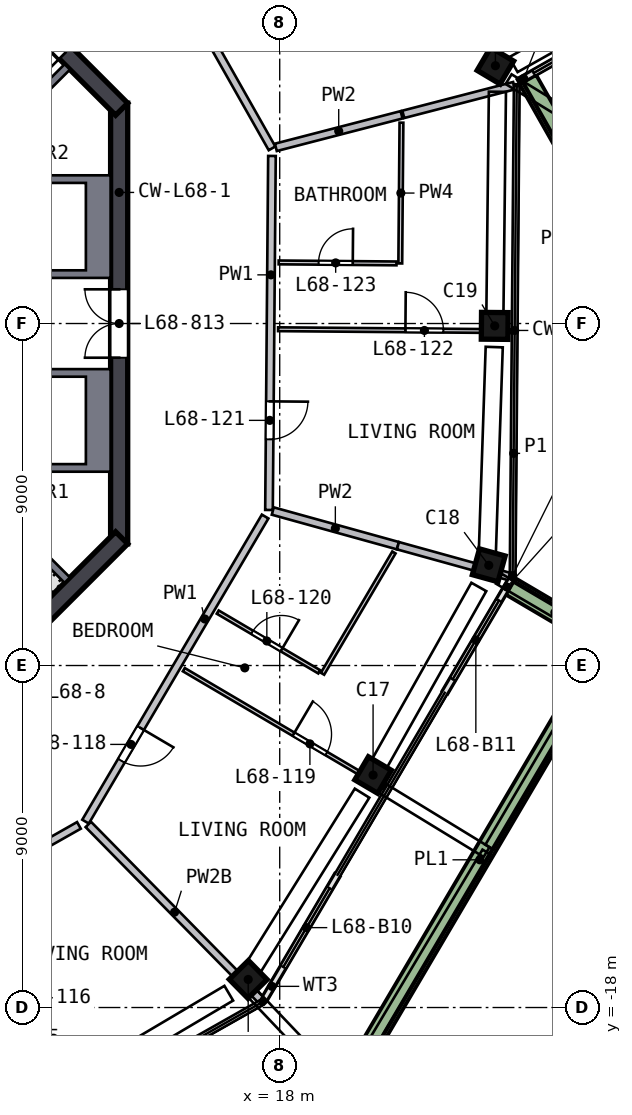
"""IFC4 building model, lengths in metres.
Left out: names, types, materials, properties, quantities, classifications, styles, units other than length and angle.
Written with IfcOpenShell. Run it as: python <this file> out.ifc"""

import sys

from ifc_helpers import new_model, si_unit, direction, frame, frame_2d, origin, origin_2d, place, context, subcontext, project, spatial, polyline, rectangle, outline, extrude, element, fill, save


model = new_model("IFC4")
c1 = context("Model", 3, precision=1e-05, world=origin(), true_north=direction((0.0, 1.0)))
c2 = subcontext(c1, "Body", "Model", "MODEL_VIEW")
j1 = project(units=[si_unit("LENGTHUNIT", "METRE"), si_unit("PLANEANGLEUNIT", "RADIAN")], contexts=[c1])
p1 = place(None, origin())
s1 = spatial("IfcSite", under=j1, at=p1, CompositionType="ELEMENT")
p2 = place(p1, origin())
s2 = spatial("IfcBuilding", under=s1, at=p2, CompositionType="ELEMENT")
p3 = place(p2, frame((0.0, 0.0, 277.5)))
s3 = spatial("IfcBuildingStorey", under=s2, at=p3, CompositionType="ELEMENT", Elevation=277.5)
p4 = place(p3, frame((17.072, -17.36, 0.0), z_axis=(0.081873788, 0.081797768, 0.993280327), x_axis=(-0.708616908, -0.696037958, 0.115729164)))
e1 = element("IfcColumn", 1, at=p4, inside=s3, PredefinedType="COLUMN", context=c2, shape_type="SweptSolid", body=[
    extrude(rectangle(XDim=0.7, YDim=0.7, at=origin_2d()), origin(), (0.0, 0.0, 1.0), 3.211),
])
p5 = place(p3, frame((20.389, -12.0, 0.0), z_axis=(0.056275557, 0.097493601, 0.993643829), x_axis=(0.504024539, 0.8563225, -0.112565713)))
e2 = element("IfcColumn", 2, at=p5, inside=s3, PredefinedType="COLUMN", context=c2, shape_type="SweptSolid", body=[
    extrude(rectangle(XDim=0.7, YDim=0.7, at=origin_2d()), origin(), (0.0, 0.0, 1.0), 3.21),
])
p6 = place(p3, frame((23.465, -6.499, 0.0), z_axis=(0.029951852, 0.111825315, 0.993276389), x_axis=(-0.265122623, -0.95724027, 0.115762953)))
e3 = element("IfcColumn", 3, at=p6, inside=s3, PredefinedType="COLUMN", context=c2, shape_type="SweptSolid", body=[
    extrude(rectangle(XDim=0.7, YDim=0.7, at=origin_2d()), origin(), (0.0, 0.0, 1.0), 3.211),
])
p7 = place(p3, frame((23.657, -0.198, 0.0), z_axis=(0.0, 0.112551351, 0.99364591), x_axis=(0.008431586, 0.993610589, -0.11254735)))
e4 = element("IfcColumn", 4, at=p7, inside=s3, PredefinedType="COLUMN", context=c2, shape_type="SweptSolid", body=[
    extrude(rectangle(XDim=0.7, YDim=0.7, at=origin_2d()), origin(), (0.0, 0.0, 1.0), 3.21),
])
p8 = place(p3, frame((23.715, 6.648, 0.0), z_axis=(-0.032531406, 0.112491779, 0.993119986), x_axis=(-0.511667819, -0.855438072, 0.080135812)))
e5 = element("IfcColumn", 5, at=p8, inside=s3, PredefinedType="COLUMN", context=c2, shape_type="SweptSolid", body=[
    extrude(rectangle(XDim=0.7, YDim=0.7, at=origin_2d()), origin(), (0.0, 0.0, 1.0), 3.212),
])
p9 = place(p3, frame((13.775, -5.799, 0.0), z_axis=(0.0, 0.0, 1.0), x_axis=(0.0, 1.0, 0.0)))
e6 = element("IfcWall", 6, at=p9, inside=s3, PredefinedType="SHEAR", context=c2, shape_type="SweptSolid", body=[
    extrude(rectangle(XDim=11.598, YDim=0.45, at=frame_2d((5.799, 0.0))), origin(), (0.0, 0.0, 1.0), 3.5),
])
p10 = place(p9, frame((4.899, 0.0, 0.0)))
e7 = element("IfcOpeningElement", 7, at=p10, cuts=e6, PredefinedType="OPENING", context=c2, shape_type="SweptSolid", body=[
    extrude(rectangle(XDim=1.8, YDim=2.1, at=frame_2d((0.9, 1.05))), frame((0.0, 0.235, 0.0), z_axis=(0.0, -1.0, 0.0), x_axis=(1.0, 0.0, 0.0)), (0.0, 0.0, 1.0), 0.47),
])
p11 = place(p3, frame((13.841, 5.64, 0.0), z_axis=(0.0, 0.0, 1.0), x_axis=(-0.707106781, 0.707106781, 0.0)))
e8 = element("IfcWall", 8, at=p11, inside=s3, PredefinedType="SHEAR", context=c2, shape_type="SweptSolid", body=[
    extrude(rectangle(XDim=11.598, YDim=0.45, at=frame_2d((5.799, 0.0))), origin(), (0.0, 0.0, 1.0), 3.5),
])
p12 = place(p11, frame((2.099, 0.0, 0.0)))
e9 = element("IfcOpeningElement", 9, at=p12, cuts=e8, PredefinedType="OPENING", context=c2, shape_type="SweptSolid", body=[
    extrude(rectangle(XDim=1.2, YDim=2.1, at=frame_2d((0.6, 1.05))), frame((0.0, 0.235, 0.0), z_axis=(0.0, -1.0, 0.0), x_axis=(1.0, 0.0, 0.0)), (0.0, 0.0, 1.0), 0.47),
])
p13 = place(p3, frame((5.64, -13.841, 0.0), z_axis=(0.0, 0.0, 1.0), x_axis=(0.707106781, 0.707106781, 0.0)))
e10 = element("IfcWall", 10, at=p13, inside=s3, PredefinedType="SHEAR", context=c2, shape_type="SweptSolid", body=[
    extrude(rectangle(XDim=11.598, YDim=0.45, at=frame_2d((5.799, 0.0))), origin(), (0.0, 0.0, 1.0), 3.5),
])
p14 = place(p13, frame((2.099, 0.0, 0.0)))
e11 = element("IfcOpeningElement", 11, at=p14, cuts=e10, PredefinedType="OPENING", context=c2, shape_type="SweptSolid", body=[
    extrude(rectangle(XDim=1.2, YDim=2.1, at=frame_2d((0.6, 1.05))), frame((0.0, 0.235, 0.0), z_axis=(0.0, -1.0, 0.0), x_axis=(1.0, 0.0, 0.0)), (0.0, 0.0, 1.0), 0.47),
])
p15 = place(p3, frame((17.595, -17.782, 0.0), z_axis=(0.0, 0.0, 1.0), x_axis=(0.507242714, 0.861803243, 0.0)))
e12 = element("IfcWall", 12, at=p15, inside=s3, PredefinedType="SOLIDWALL", context=c2, shape_type="SweptSolid", body=[
    extrude(rectangle(XDim=3.786, YDim=0.15, at=frame_2d((1.893, 0.0))), origin(), (0.0, 0.0, 1.0), 2.525),
])
p16 = place(p15, frame((0.987, 0.0, 0.0)))
e13 = element("IfcOpeningElement", 13, at=p16, cuts=e12, PredefinedType="OPENING", context=c2, shape_type="SweptSolid", body=[
    extrude(rectangle(XDim=2.4, YDim=2.4, at=frame_2d((1.2, 1.2))), frame((0.0, 0.085, 0.0), z_axis=(0.0, -1.0, 0.0), x_axis=(1.0, 0.0, 0.0)), (0.0, 0.0, 1.0), 0.17),
])
p17 = place(p3, frame((22.349, -9.705, 0.0), z_axis=(0.0, 0.0, 1.0), x_axis=(0.507238046, 0.86180599, 0.0)))
e14 = element("IfcWall", 14, at=p17, inside=s3, PredefinedType="SOLIDWALL", context=c2, shape_type="SweptSolid", body=[
    extrude(rectangle(XDim=3.427, YDim=0.15, at=frame_2d((1.713, 0.0))), origin(), (0.0, 0.0, 1.0), 2.525),
])
p18 = place(p17, frame((0.4, 0.0, 0.0)))
e15 = element("IfcOpeningElement", 15, at=p18, cuts=e14, PredefinedType="OPENING", context=c2, shape_type="SweptSolid", body=[
    extrude(rectangle(XDim=2.4, YDim=2.4, at=frame_2d((1.2, 1.2))), frame((0.0, 0.085, 0.0), z_axis=(0.0, -1.0, 0.0), x_axis=(1.0, 0.0, 0.0)), (0.0, 0.0, 1.0), 0.17),
])
p19 = place(p3, frame((24.336, 6.396, 0.0), z_axis=(0.0, 0.0, 1.0), x_axis=(0.870147605, 0.492791178, 0.0)))
e16 = element("IfcWall", 16, at=p19, inside=s3, PredefinedType="SOLIDWALL", context=c2, shape_type="SweptSolid", body=[
    extrude(rectangle(XDim=3.2, YDim=0.15, at=frame_2d((1.6, 0.0))), origin(), (0.0, 0.0, 1.0), 2.525),
])
p20 = place(p19, frame((0.4, 0.0, 0.0)))
e17 = element("IfcOpeningElement", 17, at=p20, cuts=e16, PredefinedType="OPENING", context=c2, shape_type="SweptSolid", body=[
    extrude(rectangle(XDim=2.4, YDim=2.4, at=frame_2d((1.2, 1.2))), frame((0.0, 0.085, 0.0), z_axis=(0.0, -1.0, 0.0), x_axis=(1.0, 0.0, 0.0)), (0.0, 0.0, 1.0), 0.17),
])
p21 = place(p3, frame((19.784, -20.026, 0.0), z_axis=(0.0, 0.0, 1.0), x_axis=(0.507246349, 0.861801103, 0.0)))
e18 = element("IfcWall", 18, at=p21, inside=s3, PredefinedType="SOLIDWALL", context=c2, shape_type="SweptSolid", body=[
    extrude(rectangle(XDim=13.723, YDim=0.5, at=frame_2d((6.862, 0.0))), origin(), (0.0, 0.0, 1.0), 0.7),
])
p22 = place(p3, frame((26.403, -8.288, 0.0), z_axis=(0.0, 0.0, 1.0), x_axis=(-0.861780702, 0.507281009, 0.0)))
e19 = element("IfcWall", 19, at=p22, inside=s3, PredefinedType="SOLIDWALL", context=c2, shape_type="SweptSolid", body=[
    extrude(rectangle(XDim=2.699, YDim=0.5, at=frame_2d((1.35, 0.0))), origin(), (0.0, 0.0, 1.0), 0.7),
])
p23 = place(p3, frame((24.53, 6.419, 0.0), z_axis=(0.0, 0.0, 1.0), x_axis=(0.492715997, -0.870190179, 0.0)))
e20 = element("IfcWall", 20, at=p23, inside=s3, PredefinedType="SOLIDWALL", context=c2, shape_type="SweptSolid", body=[
    extrude(rectangle(XDim=3.199, YDim=0.5, at=frame_2d((1.6, 0.0))), origin(), (0.0, 0.0, 1.0), 0.7),
])
p24 = place(p3, origin())
e21 = element("IfcWall", 21, at=p24, inside=s3, PredefinedType="SOLIDWALL", context=c2, shape_type="SweptSolid", body=[
    extrude(outline(polyline([(13.55, -3.9), (9.9, -3.9), (9.9, -3.7), (12.9, -3.7), (12.9, -1.4), (9.9, -1.4), (9.9, -1.2), (13.55, -1.2), (13.55, -3.9)])), origin(), (0.0, 0.0, 1.0), 3.19),
])
p25 = place(p3, origin())
e22 = element("IfcWall", 22, at=p25, inside=s3, PredefinedType="SOLIDWALL", context=c2, shape_type="SweptSolid", body=[
    extrude(outline(polyline([(13.55, 3.9), (13.55, 1.2), (9.9, 1.2), (9.9, 1.4), (12.9, 1.4), (12.9, 3.7), (9.9, 3.7), (9.9, 3.9), (13.55, 3.9)])), origin(), (0.0, 0.0, 1.0), 3.19),
])
for number, where, z_axis, x_axis in (
    (23, (9.334, 3.677, 0.0), (0.0, 0.0, 1.0), (0.707, 0.707, 0.0)),
    (24, (9.334, -3.677, 0.0), (0.0, 0.0, 1.0), (0.707, -0.707, 0.0)),
):
    element("IfcWall", number, at=place(p3, frame(where, z_axis=z_axis, x_axis=x_axis)), inside=s3, PredefinedType="SOLIDWALL", context=c2, shape_type="SweptSolid", body=[
        extrude(rectangle(XDim=4.35, YDim=0.2, at=frame_2d((2.175, 0.0))), origin(), (0.0, 0.0, 1.0), 3.19),
    ])
p26 = place(p3, frame((12.717, -13.207, 0.0), z_axis=(0.0, 0.0, 1.0), x_axis=(-0.870186015, -0.492723349, 0.0)))
e25 = element("IfcWall", 25, at=p26, inside=s3, PredefinedType="SOLIDWALL", context=c2, shape_type="SweptSolid", body=[
    extrude(rectangle(XDim=9.116, YDim=0.2, at=frame_2d((4.558, 0.0))), origin(), (0.0, 0.0, 1.0), 3.19),
])
p27 = place(p26, frame((1.7, 0.0, 0.0)))
e26 = element("IfcOpeningElement", 26, at=p27, cuts=e25, PredefinedType="OPENING", context=c2, shape_type="SweptSolid", body=[
    extrude(rectangle(XDim=1.0, YDim=2.1, at=frame_2d((0.5, 1.05))), frame((0.0, 0.11, 0.0), z_axis=(0.0, -1.0, 0.0), x_axis=(1.0, 0.0, 0.0)), (0.0, 0.0, 1.0), 0.22),
])
p28 = place(p3, frame((17.616, -5.079, 0.0), z_axis=(0.0, 0.0, 1.0), x_axis=(-0.507248004, -0.861800129, 0.0)))
e27 = element("IfcWall", 27, at=p28, inside=s3, PredefinedType="SOLIDWALL", context=c2, shape_type="SweptSolid", body=[
    extrude(rectangle(XDim=9.317, YDim=0.2, at=frame_2d((4.658, 0.0))), origin(), (0.0, 0.0, 1.0), 3.19),
])
p29 = place(p28, frame((6.458, 0.0, 0.0)))
e28 = element("IfcOpeningElement", 28, at=p29, cuts=e27, PredefinedType="OPENING", context=c2, shape_type="SweptSolid", body=[
    extrude(rectangle(XDim=1.0, YDim=2.1, at=frame_2d((0.5, 1.05))), frame((0.0, 0.11, 0.0), z_axis=(0.0, -1.0, 0.0), x_axis=(1.0, 0.0, 0.0)), (0.0, 0.0, 1.0), 0.22),
])
p30 = place(p3, frame((13.108, 12.891, 0.0), z_axis=(0.0, 0.0, 1.0), x_axis=(0.492734216, -0.870179862, 0.0)))
e29 = element("IfcWall", 29, at=p30, inside=s3, PredefinedType="SOLIDWALL", context=c2, shape_type="SweptSolid", body=[
    extrude(rectangle(XDim=9.517, YDim=0.2, at=frame_2d((4.758, 0.0))), origin(), (0.0, 0.0, 1.0), 3.19),
])
p31 = place(p30, frame((3.867, 0.0, 0.0)))
e30 = element("IfcOpeningElement", 30, at=p31, cuts=e29, PredefinedType="OPENING", context=c2, shape_type="SweptSolid", body=[
    extrude(rectangle(XDim=1.8, YDim=2.1, at=frame_2d((0.9, 1.05))), frame((0.0, 0.11, 0.0), z_axis=(0.0, -1.0, 0.0), x_axis=(1.0, 0.0, 0.0)), (0.0, 0.0, 1.0), 0.22),
])
p32 = place(p3, frame((17.796, 4.409, 0.0), z_axis=(0.0, 0.0, 1.0), x_axis=(-0.008385449, -0.999964842, 0.0)))
e31 = element("IfcWall", 31, at=p32, inside=s3, PredefinedType="SOLIDWALL", context=c2, shape_type="SweptSolid", body=[
    extrude(rectangle(XDim=9.317, YDim=0.2, at=frame_2d((4.658, 0.0))), origin(), (0.0, 0.0, 1.0), 3.19),
])
p33 = place(p32, frame((6.458, 0.0, 0.0)))
e32 = element("IfcOpeningElement", 32, at=p33, cuts=e31, PredefinedType="OPENING", context=c2, shape_type="SweptSolid", body=[
    extrude(rectangle(XDim=1.0, YDim=2.1, at=frame_2d((0.5, 1.05))), frame((0.0, 0.11, 0.0), z_axis=(0.0, -1.0, 0.0), x_axis=(1.0, 0.0, 0.0)), (0.0, 0.0, 1.0), 0.22),
])
p34 = place(p3, frame((12.963, -13.182, 0.0), z_axis=(0.0, 0.0, 1.0), x_axis=(0.701182118, -0.712982214, 0.0)))
e33 = element("IfcWall", 33, at=p34, inside=s3, PredefinedType="SOLIDWALL", context=c2, shape_type="SweptSolid", body=[
    extrude(rectangle(XDim=6.476, YDim=0.2, at=frame_2d((3.238, 0.0))), origin(), (0.0, 0.0, 1.0), 2.69),
])
p35 = place(p3, frame((17.818, -4.935, 0.0), z_axis=(0.0, 0.0, 1.0), x_axis=(0.963722387, -0.266906652, 0.0)))
e34 = element("IfcWall", 34, at=p35, inside=s3, PredefinedType="SOLIDWALL", context=c2, shape_type="SweptSolid", body=[
    extrude(rectangle(XDim=3.417, YDim=0.2, at=frame_2d((1.708, 0.0))), origin(), (0.0, 0.0, 1.0), 3.19),
])
p36 = place(p3, frame((21.207, 5.492, 0.0), z_axis=(0.0, 0.0, 1.0), x_axis=(-0.968053419, -0.250744047, 0.0)))
e35 = element("IfcWall", 35, at=p36, inside=s3, PredefinedType="SOLIDWALL", context=c2, shape_type="SweptSolid", body=[
    extrude(rectangle(XDim=3.418, YDim=0.2, at=frame_2d((1.709, 0.0))), origin(), (0.0, 0.0, 1.0), 3.19),
])
p37 = place(p3, frame((21.11, -5.846, 0.0), z_axis=(0.0, 0.0, 1.0), x_axis=(0.963717706, -0.266923551, 0.0)))
e36 = element("IfcWall", 36, at=p37, inside=s3, PredefinedType="SOLIDWALL", context=c2, shape_type="SweptSolid", body=[
    extrude(rectangle(XDim=3.06, YDim=0.2, at=frame_2d((1.53, 0.0))), origin(), (0.0, 0.0, 1.0), 3.19),
])
p38 = place(p3, frame((24.167, 6.259, 0.0), z_axis=(0.0, 0.0, 1.0), x_axis=(-0.968071986, -0.250672354, 0.0)))
e37 = element("IfcWall", 37, at=p38, inside=s3, PredefinedType="SOLIDWALL", context=c2, shape_type="SweptSolid", body=[
    extrude(rectangle(XDim=3.011, YDim=0.2, at=frame_2d((1.506, 0.0))), origin(), (0.0, 0.0, 1.0), 3.19),
])
p39 = place(p3, frame((16.368, -7.594, 0.0), z_axis=(0.0, 0.0, 1.0), x_axis=(0.861798542, -0.5072507, 0.0)))
e38 = element("IfcWall", 38, at=p39, inside=s3, PredefinedType="PARTITIONING", context=c2, shape_type="SweptSolid", body=[
    extrude(rectangle(XDim=3.1, YDim=0.1, at=frame_2d((1.55, 0.0))), origin(), (0.0, 0.0, 1.0), 3.19),
])
p40 = place(p39, frame((1.05, 0.0, 0.0)))
e39 = element("IfcOpeningElement", 39, at=p40, cuts=e38, PredefinedType="OPENING", context=c2, shape_type="SweptSolid", body=[
    extrude(rectangle(XDim=0.9, YDim=2.1, at=frame_2d((0.45, 1.05))), frame((0.0, 0.06, 0.0), z_axis=(0.0, -1.0, 0.0), x_axis=(1.0, 0.0, 0.0)), (0.0, 0.0, 1.0), 0.12),
])
p41 = place(p3, frame((15.477, -9.109, 0.0), z_axis=(0.0, 0.0, 1.0), x_axis=(0.861795394, -0.507256048, 0.0)))
e40 = element("IfcWall", 40, at=p41, inside=s3, PredefinedType="PARTITIONING", context=c2, shape_type="SweptSolid", body=[
    extrude(rectangle(XDim=6.15, YDim=0.1, at=frame_2d((3.075, 0.0))), origin(), (0.0, 0.0, 1.0), 3.19),
])
p42 = place(p41, frame((3.35, 0.0, 0.0)))
e41 = element("IfcOpeningElement", 41, at=p42, cuts=e40, PredefinedType="OPENING", context=c2, shape_type="SweptSolid", body=[
    extrude(rectangle(XDim=1.0, YDim=2.1, at=frame_2d((0.5, 1.05))), frame((0.0, 0.06, 0.0), z_axis=(0.0, -1.0, 0.0), x_axis=(1.0, 0.0, 0.0)), (0.0, 0.0, 1.0), 0.12),
])
p43 = place(p3, frame((17.972, 1.608, 0.0), z_axis=(0.0, 0.0, 1.0), x_axis=(0.999964493, -0.008426888, 0.0)))
e42 = element("IfcWall", 42, at=p43, inside=s3, PredefinedType="PARTITIONING", context=c2, shape_type="SweptSolid", body=[
    extrude(rectangle(XDim=3.1, YDim=0.1, at=frame_2d((1.55, 0.0))), origin(), (0.0, 0.0, 1.0), 3.19),
])
p44 = place(p43, frame((1.05, 0.0, 0.0)))
e43 = element("IfcOpeningElement", 43, at=p44, cuts=e42, PredefinedType="OPENING", context=c2, shape_type="SweptSolid", body=[
    extrude(rectangle(XDim=0.9, YDim=2.1, at=frame_2d((0.45, 1.05))), frame((0.0, 0.06, 0.0), z_axis=(0.0, -1.0, 0.0), x_axis=(1.0, 0.0, 0.0)), (0.0, 0.0, 1.0), 0.12),
])
p45 = place(p3, frame((19.126, -9.217, 0.0), z_axis=(0.0, 0.0, 1.0), x_axis=(0.507256305, 0.861795243, 0.0)))
e44 = element("IfcWall", 44, at=p45, inside=s3, PredefinedType="PARTITIONING", context=c2, shape_type="SweptSolid", body=[
    extrude(rectangle(XDim=3.704, YDim=0.1, at=frame_2d((1.852, 0.0))), origin(), (0.0, 0.0, 1.0), 3.19),
])
p46 = place(p3, frame((17.958, -0.15, 0.0), z_axis=(0.0, 0.0, 1.0), x_axis=(0.999964918, -0.008376378, 0.0)))
e45 = element("IfcWall", 45, at=p46, inside=s3, PredefinedType="PARTITIONING", context=c2, shape_type="SweptSolid", body=[
    extrude(rectangle(XDim=6.15, YDim=0.1, at=frame_2d((3.075, 0.0))), origin(), (0.0, 0.0, 1.0), 3.19),
])
p47 = place(p46, frame((3.35, 0.0, 0.0)))
e46 = element("IfcOpeningElement", 46, at=p47, cuts=e45, PredefinedType="OPENING", context=c2, shape_type="SweptSolid", body=[
    extrude(rectangle(XDim=1.0, YDim=2.1, at=frame_2d((0.5, 1.05))), frame((0.0, 0.06, 0.0), z_axis=(0.0, -1.0, 0.0), x_axis=(1.0, 0.0, 0.0)), (0.0, 0.0, 1.0), 0.12),
])
p48 = place(p3, frame((21.172, 1.581, 0.0), z_axis=(0.0, 0.0, 1.0), x_axis=(0.008370941, 0.999964963, 0.0)))
e47 = element("IfcWall", 47, at=p48, inside=s3, PredefinedType="PARTITIONING", context=c2, shape_type="SweptSolid", body=[
    extrude(rectangle(XDim=3.704, YDim=0.1, at=frame_2d((1.852, 0.0))), origin(), (0.0, 0.0, 1.0), 3.19),
])
p49 = place(p16, origin())
e48 = element("IfcDoor", 48, at=p49, inside=s3, OperationType="SLIDING_TO_LEFT", PredefinedType="DOOR", context=c2, shape_type="SweptSolid", body=[
    extrude(rectangle(XDim=2.4, YDim=2.4, at=frame_2d((1.2, 1.2))), frame((0.0, 0.025, 0.0), z_axis=(0.0, -1.0, 0.0), x_axis=(1.0, 0.0, 0.0)), (0.0, 0.0, 1.0), 0.05),
])
fill(e13, e48)
p50 = place(p18, origin())
e49 = element("IfcDoor", 49, at=p50, inside=s3, OperationType="SLIDING_TO_RIGHT", PredefinedType="DOOR", context=c2, shape_type="SweptSolid", body=[
    extrude(rectangle(XDim=2.4, YDim=2.4, at=frame_2d((1.2, 1.2))), frame((0.0, 0.025, 0.0), z_axis=(0.0, -1.0, 0.0), x_axis=(1.0, 0.0, 0.0)), (0.0, 0.0, 1.0), 0.05),
])
fill(e15, e49)
p51 = place(p20, origin())
e50 = element("IfcDoor", 50, at=p51, inside=s3, OperationType="SLIDING_TO_LEFT", PredefinedType="DOOR", context=c2, shape_type="SweptSolid", body=[
    extrude(rectangle(XDim=2.4, YDim=2.4, at=frame_2d((1.2, 1.2))), frame((0.0, 0.025, 0.0), z_axis=(0.0, -1.0, 0.0), x_axis=(1.0, 0.0, 0.0)), (0.0, 0.0, 1.0), 0.05),
])
fill(e17, e50)
p52 = place(p10, origin())
e51 = element("IfcDoor", 51, at=p52, inside=s3, OperationType="DOUBLE_DOOR_SINGLE_SWING", PredefinedType="DOOR", context=c2, shape_type="SweptSolid", body=[
    extrude(rectangle(XDim=1.8, YDim=2.1, at=frame_2d((0.9, 1.05))), frame((0.0, 0.025, 0.0), z_axis=(0.0, -1.0, 0.0), x_axis=(1.0, 0.0, 0.0)), (0.0, 0.0, 1.0), 0.05),
])
fill(e7, e51)
p53 = place(p12, origin())
e52 = element("IfcDoor", 52, at=p53, inside=s3, OperationType="SINGLE_SWING_LEFT", PredefinedType="DOOR", context=c2, shape_type="SweptSolid", body=[
    extrude(rectangle(XDim=1.2, YDim=2.1, at=frame_2d((0.6, 1.05))), frame((0.0, 0.025, 0.0), z_axis=(0.0, -1.0, 0.0), x_axis=(1.0, 0.0, 0.0)), (0.0, 0.0, 1.0), 0.05),
])
fill(e9, e52)
p54 = place(p29, origin())
e53 = element("IfcDoor", 53, at=p54, inside=s3, OperationType="SINGLE_SWING_LEFT", PredefinedType="DOOR", context=c2, shape_type="SweptSolid", body=[
    extrude(rectangle(XDim=1.0, YDim=2.1, at=frame_2d((0.5, 1.05))), frame((0.0, 0.025, 0.0), z_axis=(0.0, -1.0, 0.0), x_axis=(1.0, 0.0, 0.0)), (0.0, 0.0, 1.0), 0.05),
])
fill(e28, e53)
p55 = place(p42, origin())
e54 = element("IfcDoor", 54, at=p55, inside=s3, OperationType="SINGLE_SWING_LEFT", PredefinedType="DOOR", context=c2, shape_type="SweptSolid", body=[
    extrude(rectangle(XDim=1.0, YDim=2.1, at=frame_2d((0.5, 1.05))), frame((0.0, 0.025, 0.0), z_axis=(0.0, -1.0, 0.0), x_axis=(1.0, 0.0, 0.0)), (0.0, 0.0, 1.0), 0.05),
])
fill(e41, e54)
p56 = place(p40, origin())
e55 = element("IfcDoor", 55, at=p56, inside=s3, OperationType="SINGLE_SWING_RIGHT", PredefinedType="DOOR", context=c2, shape_type="SweptSolid", body=[
    extrude(rectangle(XDim=0.9, YDim=2.1, at=frame_2d((0.45, 1.05))), frame((0.0, 0.025, 0.0), z_axis=(0.0, -1.0, 0.0), x_axis=(1.0, 0.0, 0.0)), (0.0, 0.0, 1.0), 0.05),
])
fill(e39, e55)
p57 = place(p33, origin())
e56 = element("IfcDoor", 56, at=p57, inside=s3, OperationType="SINGLE_SWING_LEFT", PredefinedType="DOOR", context=c2, shape_type="SweptSolid", body=[
    extrude(rectangle(XDim=1.0, YDim=2.1, at=frame_2d((0.5, 1.05))), frame((0.0, 0.025, 0.0), z_axis=(0.0, -1.0, 0.0), x_axis=(1.0, 0.0, 0.0)), (0.0, 0.0, 1.0), 0.05),
])
fill(e32, e56)
p58 = place(p47, origin())
e57 = element("IfcDoor", 57, at=p58, inside=s3, OperationType="SINGLE_SWING_LEFT", PredefinedType="DOOR", context=c2, shape_type="SweptSolid", body=[
    extrude(rectangle(XDim=1.0, YDim=2.1, at=frame_2d((0.5, 1.05))), frame((0.0, 0.025, 0.0), z_axis=(0.0, -1.0, 0.0), x_axis=(1.0, 0.0, 0.0)), (0.0, 0.0, 1.0), 0.05),
])
fill(e46, e57)
p59 = place(p44, origin())
e58 = element("IfcDoor", 58, at=p59, inside=s3, OperationType="SINGLE_SWING_RIGHT", PredefinedType="DOOR", context=c2, shape_type="SweptSolid", body=[
    extrude(rectangle(XDim=0.9, YDim=2.1, at=frame_2d((0.45, 1.05))), frame((0.0, 0.025, 0.0), z_axis=(0.0, -1.0, 0.0), x_axis=(1.0, 0.0, 0.0)), (0.0, 0.0, 1.0), 0.05),
])
fill(e43, e58)
save(model, sys.argv[1])
